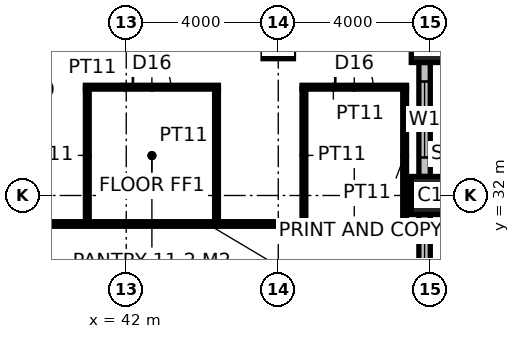
"""IFC4 building model, lengths in metres.
Left out: names, types, materials, properties, quantities, classifications, styles, units other than length and angle.
Written with IfcOpenShell. Run it as: python <this file> out.ifc"""

import sys

from ifc_helpers import new_model, si_unit, direction, frame, frame_2d, origin, origin_2d, place, context, subcontext, project, spatial, rectangle, hollow_rectangle, extrude, element, fill, save


model = new_model("IFC4")
c1 = context("Model", 3, precision=1e-05, world=origin(), true_north=direction((0.0, 1.0)))
c2 = subcontext(c1, "Body", "Model", "MODEL_VIEW")
j1 = project(units=[si_unit("LENGTHUNIT", "METRE"), si_unit("PLANEANGLEUNIT", "RADIAN")], contexts=[c1])
p1 = place(None, origin())
s1 = spatial("IfcSite", under=j1, at=p1, CompositionType="ELEMENT")
p2 = place(p1, origin())
s2 = spatial("IfcBuilding", under=s1, at=p2, CompositionType="ELEMENT")
p3 = place(p2, frame((0.0, 0.0, 226.2)))
s3 = spatial("IfcBuildingStorey", under=s2, at=p3, CompositionType="ELEMENT", Elevation=226.2)
for number, where, z_axis, x_axis in (
    (1, (50.0, 32.0, 0.0), (0.0, 0.0, 1.0), (1.0, 0.0, 0.0)),
    (2, (50.0, 36.0, 0.0), (0.0, 0.0, 1.0), (1.0, 0.0, 0.0)),
):
    element("IfcColumn", number, at=place(p3, frame(where, z_axis=z_axis, x_axis=x_axis)), inside=s3, PredefinedType="COLUMN", context=c2, shape_type="SweptSolid", body=[
        extrude(hollow_rectangle(XDim=1.0, YDim=1.0, WallThickness=0.1, at=origin_2d()), origin(), (0.0, 0.0, 1.0), 4.0),
    ])
p4 = place(p3, frame((46.0, 36.0, 0.0), z_axis=(0.0, 0.0, 1.0), x_axis=(1.0, 0.0, 0.0)))
e3 = element("IfcColumn", 3, at=p4, inside=s3, PredefinedType="COLUMN", context=c2, shape_type="SweptSolid", body=[
    extrude(hollow_rectangle(XDim=0.8, YDim=0.8, WallThickness=0.08, at=origin_2d()), origin(), (0.0, 0.0, 1.0), 4.0),
])
p5 = place(p3, frame((38.575, 31.25, 0.0), z_axis=(0.0, 0.0, 1.0), x_axis=(1.0, 0.0, 0.0)))
e4 = element("IfcWall", 4, at=p5, inside=s3, PredefinedType="PARTITIONING", context=c2, shape_type="SweptSolid", body=[
    extrude(rectangle(XDim=11.125, YDim=0.12, at=frame_2d((5.562, 0.0))), origin(), (0.0, 0.0, 1.0), 3.85),
])
p6 = place(p3, frame((40.925, 34.85, 0.0), z_axis=(0.0, 0.0, 1.0), x_axis=(1.0, 0.0, 0.0)))
e5 = element("IfcWall", 5, at=p6, inside=s3, PredefinedType="PARTITIONING", context=c2, shape_type="SweptSolid", body=[
    extrude(rectangle(XDim=3.5, YDim=0.1, at=frame_2d((1.75, 0.0))), origin(), (0.0, 0.0, 1.0), 3.85),
])
p7 = place(p6, frame((1.25, 0.0, 0.0)))
e6 = element("IfcOpeningElement", 6, at=p7, cuts=e5, PredefinedType="OPENING", context=c2, shape_type="SweptSolid", body=[
    extrude(rectangle(XDim=1.0, YDim=2.2, at=frame_2d((0.5, 1.1))), frame((0.0, 0.06, 0.0), z_axis=(0.0, -1.0, 0.0), x_axis=(1.0, 0.0, 0.0)), (0.0, 0.0, 1.0), 0.12),
])
p8 = place(p3, frame((46.625, 34.85, 0.0), z_axis=(0.0, 0.0, 1.0), x_axis=(1.0, 0.0, 0.0)))
e7 = element("IfcWall", 7, at=p8, inside=s3, PredefinedType="PARTITIONING", context=c2, shape_type="SweptSolid", body=[
    extrude(rectangle(XDim=2.75, YDim=0.1, at=frame_2d((1.375, 0.0))), origin(), (0.0, 0.0, 1.0), 3.85),
])
p9 = place(p8, frame((0.875, 0.0, 0.0)))
e8 = element("IfcOpeningElement", 8, at=p9, cuts=e7, PredefinedType="OPENING", context=c2, shape_type="SweptSolid", body=[
    extrude(rectangle(XDim=1.0, YDim=2.2, at=frame_2d((0.5, 1.1))), frame((0.0, 0.06, 0.0), z_axis=(0.0, -1.0, 0.0), x_axis=(1.0, 0.0, 0.0)), (0.0, 0.0, 1.0), 0.12),
])
for number, where, z_axis, x_axis in (
    (9, (40.975, 31.31, 0.0), (0.0, 0.0, 1.0), (0.0, 1.0, 0.0)),
    (10, (44.375, 31.31, 0.0), (0.0, 0.0, 1.0), (0.0, 1.0, 0.0)),
    (11, (46.675, 31.31, 0.0), (0.0, 0.0, 1.0), (0.0, 1.0, 0.0)),
    (12, (49.325, 31.31, 0.0), (0.0, 0.0, 1.0), (0.0, 1.0, 0.0)),
):
    element("IfcWall", number, at=place(p3, frame(where, z_axis=z_axis, x_axis=x_axis)), inside=s3, PredefinedType="PARTITIONING", context=c2, shape_type="SweptSolid", body=[
        extrude(rectangle(XDim=3.49, YDim=0.1, at=frame_2d((1.745, 0.0))), origin(), (0.0, 0.0, 1.0), 3.85),
    ])
p10 = place(p3, frame((49.85, 28.5, 0.0), z_axis=(0.0, 0.0, 1.0), x_axis=(0.0, 1.0, 0.0)))
e13 = element("IfcWall", 13, at=p10, inside=s3, PredefinedType="ELEMENTEDWALL", context=c2, shape_type="SweptSolid", body=[
    extrude(rectangle(XDim=3.0, YDim=0.3, at=frame_2d((1.5, 0.0))), origin(), (0.0, 0.0, 1.0), 2.85),
])
p11 = place(p10, frame((0.5, 0.0, 0.8)))
e14 = element("IfcOpeningElement", 14, at=p11, cuts=e13, PredefinedType="OPENING", context=c2, shape_type="SweptSolid", body=[
    extrude(rectangle(XDim=2.0, YDim=2.0, at=frame_2d((1.0, 1.0))), frame((0.0, 0.16, 0.0), z_axis=(0.0, -1.0, 0.0), x_axis=(1.0, 0.0, 0.0)), (0.0, 0.0, 1.0), 0.32),
])
p12 = place(p3, frame((49.85, 32.5, 0.0), z_axis=(0.0, 0.0, 1.0), x_axis=(0.0, 1.0, 0.0)))
e15 = element("IfcWall", 15, at=p12, inside=s3, PredefinedType="ELEMENTEDWALL", context=c2, shape_type="SweptSolid", body=[
    extrude(rectangle(XDim=3.0, YDim=0.3, at=frame_2d((1.5, 0.0))), origin(), (0.0, 0.0, 1.0), 2.85),
])
p13 = place(p12, frame((0.5, 0.0, 0.8)))
e16 = element("IfcOpeningElement", 16, at=p13, cuts=e15, PredefinedType="OPENING", context=c2, shape_type="SweptSolid", body=[
    extrude(rectangle(XDim=2.0, YDim=2.0, at=frame_2d((1.0, 1.0))), frame((0.0, 0.16, 0.0), z_axis=(0.0, -1.0, 0.0), x_axis=(1.0, 0.0, 0.0)), (0.0, 0.0, 1.0), 0.32),
])
p14 = place(p7, origin())
e17 = element("IfcDoor", 17, at=p14, inside=s3, OperationType="SINGLE_SWING_LEFT", PredefinedType="DOOR", context=c2, shape_type="SweptSolid", body=[
    extrude(rectangle(XDim=1.0, YDim=2.2, at=frame_2d((0.5, 1.1))), frame((0.0, 0.025, 0.0), z_axis=(0.0, -1.0, 0.0), x_axis=(1.0, 0.0, 0.0)), (0.0, 0.0, 1.0), 0.05),
])
fill(e6, e17)
p15 = place(p9, origin())
e18 = element("IfcDoor", 18, at=p15, inside=s3, OperationType="SINGLE_SWING_LEFT", PredefinedType="DOOR", context=c2, shape_type="SweptSolid", body=[
    extrude(rectangle(XDim=1.0, YDim=2.2, at=frame_2d((0.5, 1.1))), frame((0.0, 0.025, 0.0), z_axis=(0.0, -1.0, 0.0), x_axis=(1.0, 0.0, 0.0)), (0.0, 0.0, 1.0), 0.05),
])
fill(e8, e18)
p16 = place(p11, origin())
e19 = element("IfcWindow", 19, at=p16, inside=s3, PartitioningType="SINGLE_PANEL", PredefinedType="WINDOW", context=c2, shape_type="SweptSolid", body=[
    extrude(rectangle(XDim=2.0, YDim=2.0, at=frame_2d((1.0, 1.0))), frame((0.0, 0.03, 0.0), z_axis=(0.0, -1.0, 0.0), x_axis=(1.0, 0.0, 0.0)), (0.0, 0.0, 1.0), 0.06),
])
fill(e14, e19)
p17 = place(p13, origin())
e20 = element("IfcWindow", 20, at=p17, inside=s3, PartitioningType="SINGLE_PANEL", PredefinedType="WINDOW", context=c2, shape_type="SweptSolid", body=[
    extrude(rectangle(XDim=2.0, YDim=2.0, at=frame_2d((1.0, 1.0))), frame((0.0, 0.03, 0.0), z_axis=(0.0, -1.0, 0.0), x_axis=(1.0, 0.0, 0.0)), (0.0, 0.0, 1.0), 0.06),
])
fill(e16, e20)
save(model, sys.argv[1])
